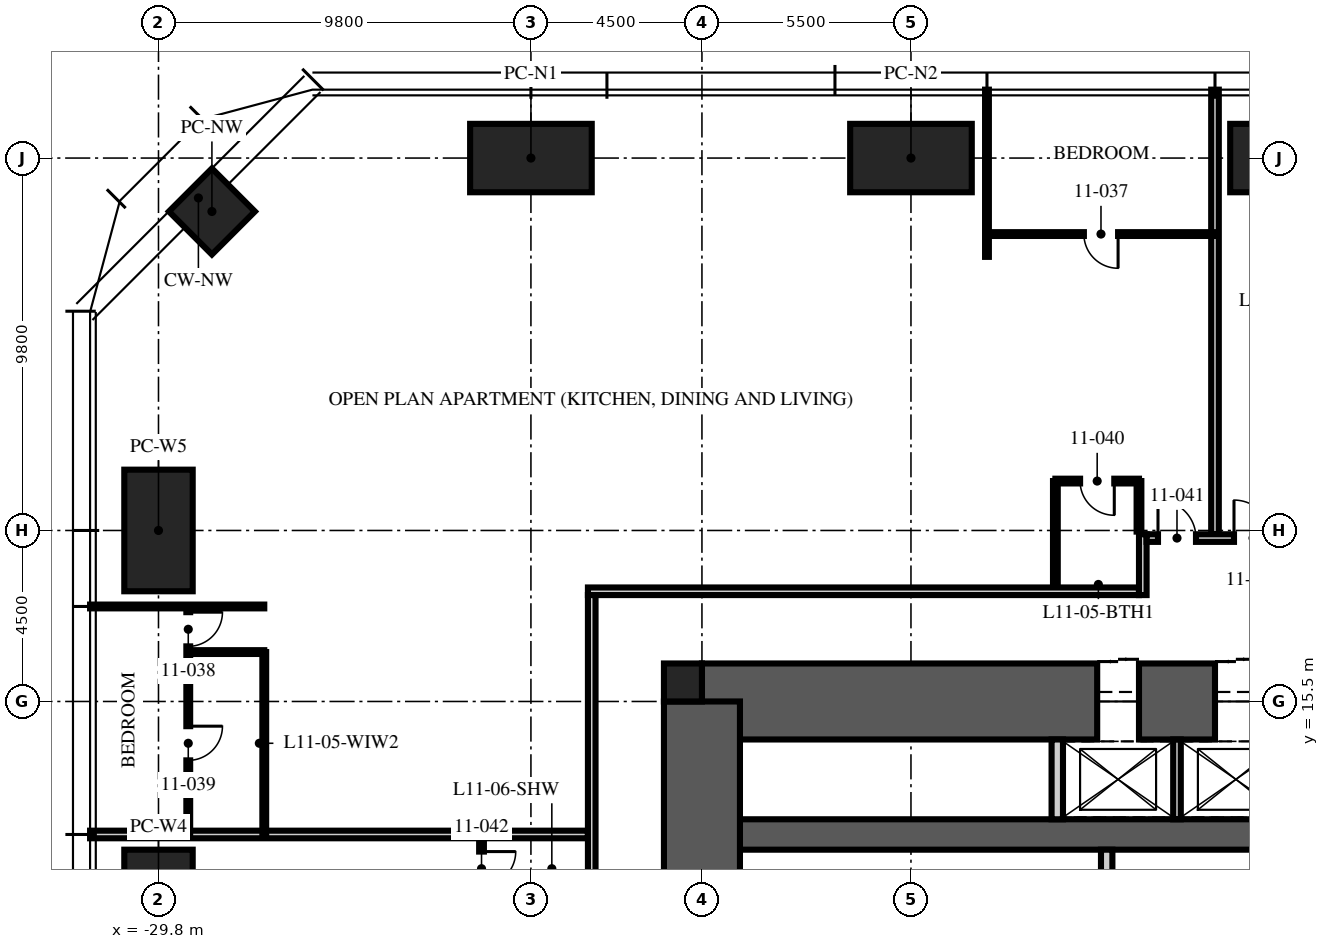
"""IFC4 building model, lengths in metres.
Left out: names, types, materials, properties, quantities, classifications, styles, units other than length and angle.
Written with IfcOpenShell. Run it as: python <this file> out.ifc"""

import sys

from ifc_helpers import new_model, si_unit, direction, frame, frame_2d, origin, origin_2d, place, context, subcontext, project, spatial, rectangle, hollow_rectangle, extrude, element, fill, save


model = new_model("IFC4")
c1 = context("Model", 3, precision=1e-05, world=origin(), true_north=direction((0.0, 1.0)))
c2 = subcontext(c1, "Body", "Model", "MODEL_VIEW")
j1 = project(units=[si_unit("LENGTHUNIT", "METRE"), si_unit("PLANEANGLEUNIT", "RADIAN")], contexts=[c1])
p1 = place(None, origin())
s1 = spatial("IfcSite", under=j1, at=p1, CompositionType="ELEMENT")
p2 = place(p1, origin())
s2 = spatial("IfcBuilding", under=s1, at=p2, CompositionType="ELEMENT")
p3 = place(p2, frame((0.0, 0.0, 47.25)))
s3 = spatial("IfcBuildingStorey", under=s2, at=p3, CompositionType="ELEMENT", Elevation=47.25)
p4 = place(p3, frame((-15.5, 15.5, -0.25), z_axis=(0.0, 0.0, 1.0), x_axis=(1.0, 0.0, 0.0)))
e1 = element("IfcWall", 1, at=p4, inside=s3, PredefinedType="SHEAR", context=c2, shape_type="SweptSolid", body=[
    extrude(rectangle(XDim=31.0, YDim=2.0, at=frame_2d((15.5, 0.0))), origin(), (0.0, 0.0, 1.0), 3.75),
])
p5 = place(p4, frame((10.4, 0.0, 0.25)))
e2 = element("IfcOpeningElement", 2, at=p5, cuts=e1, PredefinedType="OPENING", context=c2, shape_type="SweptSolid", body=[
    extrude(rectangle(XDim=1.1, YDim=2.1, at=frame_2d((0.55, 1.05))), frame((0.0, 1.01, 0.0), z_axis=(0.0, -1.0, 0.0), x_axis=(1.0, 0.0, 0.0)), (0.0, 0.0, 1.0), 2.02),
])
p6 = place(p4, frame((13.5, 0.0, 0.25)))
e3 = element("IfcOpeningElement", 3, at=p6, cuts=e1, PredefinedType="OPENING", context=c2, shape_type="SweptSolid", body=[
    extrude(rectangle(XDim=1.1, YDim=2.1, at=frame_2d((0.55, 1.05))), frame((0.0, 1.01, 0.0), z_axis=(0.0, -1.0, 0.0), x_axis=(1.0, 0.0, 0.0)), (0.0, 0.0, 1.0), 2.02),
])
p7 = place(p4, frame((16.6, 0.0, 0.25)))
e4 = element("IfcOpeningElement", 4, at=p7, cuts=e1, PredefinedType="OPENING", context=c2, shape_type="SweptSolid", body=[
    extrude(rectangle(XDim=1.1, YDim=2.1, at=frame_2d((0.55, 1.05))), frame((0.0, 1.01, 0.0), z_axis=(0.0, -1.0, 0.0), x_axis=(1.0, 0.0, 0.0)), (0.0, 0.0, 1.0), 2.02),
])
p8 = place(p3, frame((-15.5, 12.0, -0.25), z_axis=(0.0, 0.0, 1.0), x_axis=(1.0, 0.0, 0.0)))
e5 = element("IfcWall", 5, at=p8, inside=s3, PredefinedType="SHEAR", context=c2, shape_type="SweptSolid", body=[
    extrude(rectangle(XDim=31.0, YDim=0.8, at=frame_2d((15.5, 0.0))), origin(), (0.0, 0.0, 1.0), 3.75),
])
p9 = place(p3, frame((-15.5, -15.5, -0.25), z_axis=(0.0, 0.0, 1.0), x_axis=(0.0, 1.0, 0.0)))
e6 = element("IfcWall", 6, at=p9, inside=s3, PredefinedType="SHEAR", context=c2, shape_type="SweptSolid", body=[
    extrude(rectangle(XDim=31.0, YDim=2.0, at=frame_2d((15.5, 0.0))), origin(), (0.0, 0.0, 1.0), 3.75),
])
p10 = place(p9, frame((6.5, 0.0, 0.25)))
e7 = element("IfcOpeningElement", 7, at=p10, cuts=e6, PredefinedType="OPENING", context=c2, shape_type="SweptSolid", body=[
    extrude(rectangle(XDim=1.2, YDim=2.1, at=frame_2d((0.6, 1.05))), frame((0.0, 1.01, 0.0), z_axis=(0.0, -1.0, 0.0), x_axis=(1.0, 0.0, 0.0)), (0.0, 0.0, 1.0), 2.02),
])
p11 = place(p9, frame((23.0, 0.0, 0.25)))
e8 = element("IfcOpeningElement", 8, at=p11, cuts=e6, PredefinedType="OPENING", context=c2, shape_type="SweptSolid", body=[
    extrude(rectangle(XDim=1.8, YDim=2.1, at=frame_2d((0.9, 1.05))), frame((0.0, 1.01, 0.0), z_axis=(0.0, -1.0, 0.0), x_axis=(1.0, 0.0, 0.0)), (0.0, 0.0, 1.0), 2.02),
])
p12 = place(p3, frame((-16.0, 16.0, -0.25), z_axis=(0.0, 0.0, 1.0), x_axis=(1.0, 0.0, 0.0)))
e9 = element("IfcColumn", 9, at=p12, inside=s3, PredefinedType="COLUMN", context=c2, shape_type="SweptSolid", body=[
    extrude(rectangle(XDim=1.0, YDim=1.0, at=origin_2d()), origin(), (0.0, 0.0, 1.0), 3.75),
])
for number, where, z_axis, x_axis in (
    (10, (-20.0, 29.8, 0.0), (0.0, 0.0, 1.0), (1.0, 0.0, 0.0)),
    (11, (-10.0, 29.8, 0.0), (0.0, 0.0, 1.0), (1.0, 0.0, 0.0)),
    (12, (0.0, 29.8, 0.0), (0.0, 0.0, 1.0), (1.0, 0.0, 0.0)),
    (13, (-29.8, 10.0, 0.0), (0.0, 0.0, 1.0), (0.0, 1.0, 0.0)),
    (14, (-29.8, 20.0, 0.0), (0.0, 0.0, 1.0), (0.0, 1.0, 0.0)),
):
    element("IfcColumn", number, at=place(p3, frame(where, z_axis=z_axis, x_axis=x_axis)), inside=s3, PredefinedType="COLUMN", context=c2, shape_type="SweptSolid", body=[
        extrude(hollow_rectangle(XDim=3.2, YDim=1.8, WallThickness=0.2, at=origin_2d()), origin(), (0.0, 0.0, 1.0), 3.75),
    ])
p13 = place(p3, frame((-28.394, 28.394, 0.0), z_axis=(0.0, 0.0, 1.0), x_axis=(0.707106781187, 0.707106781187, 0.0)))
e15 = element("IfcColumn", 15, at=p13, inside=s3, PredefinedType="COLUMN", context=c2, shape_type="SweptSolid", body=[
    extrude(hollow_rectangle(XDim=1.6, YDim=1.6, WallThickness=0.1, at=origin_2d()), origin(), (0.0, 0.0, 1.0), 3.75),
])
p14 = place(p3, frame((-6.15, 12.4, 0.0), z_axis=(0.0, 0.0, 1.0), x_axis=(0.0, 1.0, 0.0)))
e16 = element("IfcWall", 16, at=p14, inside=s3, PredefinedType="PARTITIONING", context=c2, shape_type="SweptSolid", body=[
    extrude(rectangle(XDim=2.1, YDim=0.3, at=frame_2d((1.05, 0.0))), origin(), (0.0, 0.0, 1.0), 3.5),
])
p15 = place(p3, frame((-3.0, 12.4, 0.0), z_axis=(0.0, 0.0, 1.0), x_axis=(0.0, 1.0, 0.0)))
e17 = element("IfcWall", 17, at=p15, inside=s3, PredefinedType="PARTITIONING", context=c2, shape_type="SweptSolid", body=[
    extrude(rectangle(XDim=2.1, YDim=0.2, at=frame_2d((1.05, 0.0))), origin(), (0.0, 0.0, 1.0), 3.5),
])
p16 = place(p3, frame((-4.85, 5.3, 0.0), z_axis=(0.0, 0.0, 1.0), x_axis=(0.0, 1.0, 0.0)))
e18 = element("IfcWall", 18, at=p16, inside=s3, PredefinedType="PARTITIONING", context=c2, shape_type="SweptSolid", body=[
    extrude(rectangle(XDim=6.3, YDim=0.3, at=frame_2d((3.15, 0.0))), origin(), (0.0, 0.0, 1.0), 3.5),
])
p17 = place(p16, frame((4.35, 0.0, 0.0)))
e19 = element("IfcOpeningElement", 19, at=p17, cuts=e18, PredefinedType="OPENING", context=c2, shape_type="SweptSolid", body=[
    extrude(rectangle(XDim=0.9, YDim=2.1, at=frame_2d((0.45, 1.05))), frame((0.0, 0.16, 0.0), z_axis=(0.0, -1.0, 0.0), x_axis=(1.0, 0.0, 0.0)), (0.0, 0.0, 1.0), 0.32),
])
p18 = place(p3, frame((-2.0, 19.9, 0.0), z_axis=(0.0, 0.0, 1.0), x_axis=(0.0, 1.0, 0.0)))
e20 = element("IfcWall", 20, at=p18, inside=s3, PredefinedType="PARTITIONING", context=c2, shape_type="SweptSolid", body=[
    extrude(rectangle(XDim=11.7, YDim=0.2, at=frame_2d((5.85, 0.0))), origin(), (0.0, 0.0, 1.0), 2.71),
])
p19 = place(p3, frame((-8.0, 27.2, 0.0), z_axis=(0.0, 0.0, 1.0), x_axis=(0.0, 1.0, 0.0)))
e21 = element("IfcWall", 21, at=p19, inside=s3, PredefinedType="PARTITIONING", context=c2, shape_type="SweptSolid", body=[
    extrude(rectangle(XDim=4.4, YDim=0.1, at=frame_2d((2.2, 0.0))), origin(), (0.0, 0.0, 1.0), 2.71),
])
p20 = place(p3, frame((-27.017, 18.0, 0.0), z_axis=(0.0, 0.0, 1.0), x_axis=(-1.0, 0.0, 0.0)))
e22 = element("IfcWall", 22, at=p20, inside=s3, PredefinedType="PARTITIONING", context=c2, shape_type="SweptSolid", body=[
    extrude(rectangle(XDim=4.583, YDim=0.1, at=frame_2d((2.292, 0.0))), origin(), (0.0, 0.0, 1.0), 2.71),
])
p21 = place(p3, frame((-18.5, 12.0, 0.0), z_axis=(0.0, 0.0, 1.0), x_axis=(-1.0, 0.0, 0.0)))
e23 = element("IfcWall", 23, at=p21, inside=s3, PredefinedType="PARTITIONING", context=c2, shape_type="SweptSolid", body=[
    extrude(rectangle(XDim=13.1, YDim=0.2, at=frame_2d((6.55, 0.0))), origin(), (0.0, 0.0, 1.0), 2.71),
])
p22 = place(p3, frame((-2.0, 27.8, 0.0), z_axis=(0.0, 0.0, 1.0), x_axis=(-1.0, 0.0, 0.0)))
e24 = element("IfcWall", 24, at=p22, inside=s3, PredefinedType="PARTITIONING", context=c2, shape_type="SweptSolid", body=[
    extrude(rectangle(XDim=6.0, YDim=0.1, at=frame_2d((3.0, 0.0))), origin(), (0.0, 0.0, 1.0), 2.61),
])
p23 = place(p22, frame((2.55, 0.0, 0.0)))
e25 = element("IfcOpeningElement", 25, at=p23, cuts=e24, PredefinedType="OPENING", context=c2, shape_type="SweptSolid", body=[
    extrude(rectangle(XDim=0.9, YDim=2.1, at=frame_2d((0.45, 1.05))), frame((0.0, 0.06, 0.0), z_axis=(0.0, -1.0, 0.0), x_axis=(1.0, 0.0, 0.0)), (0.0, 0.0, 1.0), 0.12),
])
p24 = place(p3, frame((-29.017, 18.0, 0.0), z_axis=(0.0, 0.0, 1.0), x_axis=(0.0, -1.0, 0.0)))
e26 = element("IfcWall", 26, at=p24, inside=s3, PredefinedType="PARTITIONING", context=c2, shape_type="SweptSolid", body=[
    extrude(rectangle(XDim=6.0, YDim=0.1, at=frame_2d((3.0, 0.0))), origin(), (0.0, 0.0, 1.0), 2.61),
])
p25 = place(p24, frame((0.15, 0.0, 0.0)))
e27 = element("IfcOpeningElement", 27, at=p25, cuts=e26, PredefinedType="OPENING", context=c2, shape_type="SweptSolid", body=[
    extrude(rectangle(XDim=0.9, YDim=2.1, at=frame_2d((0.45, 1.05))), frame((0.0, 0.06, 0.0), z_axis=(0.0, -1.0, 0.0), x_axis=(1.0, 0.0, 0.0)), (0.0, 0.0, 1.0), 0.12),
])
p26 = place(p24, frame((3.15, 0.0, 0.0)))
e28 = element("IfcOpeningElement", 28, at=p26, cuts=e26, PredefinedType="OPENING", context=c2, shape_type="SweptSolid", body=[
    extrude(rectangle(XDim=0.9, YDim=2.1, at=frame_2d((0.45, 1.05))), frame((0.0, 0.06, 0.0), z_axis=(0.0, -1.0, 0.0), x_axis=(1.0, 0.0, 0.0)), (0.0, 0.0, 1.0), 0.12),
])
p27 = place(p3, frame((-27.017, 16.8, 0.0), z_axis=(0.0, 0.0, 1.0), x_axis=(-1.0, 0.0, 0.0)))
e29 = element("IfcWall", 29, at=p27, inside=s3, PredefinedType="PARTITIONING", context=c2, shape_type="SweptSolid", body=[
    extrude(rectangle(XDim=2.0, YDim=0.1, at=frame_2d((1.0, 0.0))), origin(), (0.0, 0.0, 1.0), 3.5),
])
p28 = place(p3, frame((-27.017, 16.8, 0.0), z_axis=(0.0, 0.0, 1.0), x_axis=(0.0, -1.0, 0.0)))
e30 = element("IfcWall", 30, at=p28, inside=s3, PredefinedType="PARTITIONING", context=c2, shape_type="SweptSolid", body=[
    extrude(rectangle(XDim=4.8, YDim=0.1, at=frame_2d((2.4, 0.0))), origin(), (0.0, 0.0, 1.0), 2.61),
])
p29 = place(p3, frame((-4.0, 21.3, 0.0), z_axis=(0.0, 0.0, 1.0), x_axis=(-1.0, 0.0, 0.0)))
e31 = element("IfcWall", 31, at=p29, inside=s3, PredefinedType="PARTITIONING", context=c2, shape_type="SweptSolid", body=[
    extrude(rectangle(XDim=2.2, YDim=0.125, at=frame_2d((1.1, 0.0))), origin(), (0.0, 0.0, 1.0), 2.61),
])
p30 = place(p29, frame((0.65, 0.0, 0.0)))
e32 = element("IfcOpeningElement", 32, at=p30, cuts=e31, PredefinedType="OPENING", context=c2, shape_type="SweptSolid", body=[
    extrude(rectangle(XDim=0.9, YDim=2.1, at=frame_2d((0.45, 1.05))), frame((0.0, 0.073, 0.0), z_axis=(0.0, -1.0, 0.0), x_axis=(1.0, 0.0, 0.0)), (0.0, 0.0, 1.0), 0.145),
])
p31 = place(p3, frame((-4.0, 19.97, 0.0), z_axis=(0.0, 0.0, 1.0), x_axis=(0.0, 1.0, 0.0)))
e33 = element("IfcWall", 33, at=p31, inside=s3, PredefinedType="PARTITIONING", context=c2, shape_type="SweptSolid", body=[
    extrude(rectangle(XDim=1.33, YDim=0.125, at=frame_2d((0.665, 0.0))), origin(), (0.0, 0.0, 1.0), 3.5),
])
p32 = place(p3, frame((-6.2, 18.5, 0.0), z_axis=(0.0, 0.0, 1.0), x_axis=(0.0, 1.0, 0.0)))
e34 = element("IfcWall", 34, at=p32, inside=s3, PredefinedType="PARTITIONING", context=c2, shape_type="SweptSolid", body=[
    extrude(rectangle(XDim=2.8, YDim=0.125, at=frame_2d((1.4, 0.0))), origin(), (0.0, 0.0, 1.0), 3.5),
])
p33 = place(p3, frame((-21.3, 12.0, 0.0), z_axis=(0.0, 0.0, 1.0), x_axis=(0.0, -1.0, 0.0)))
e35 = element("IfcWall", 35, at=p33, inside=s3, PredefinedType="PARTITIONING", context=c2, shape_type="SweptSolid", body=[
    extrude(rectangle(XDim=1.8, YDim=0.125, at=frame_2d((0.9, 0.0))), origin(), (0.0, 0.0, 1.0), 3.5),
])
p34 = place(p33, frame((0.45, 0.0, 0.0)))
e36 = element("IfcOpeningElement", 36, at=p34, cuts=e35, PredefinedType="OPENING", context=c2, shape_type="SweptSolid", body=[
    extrude(rectangle(XDim=0.9, YDim=2.1, at=frame_2d((0.45, 1.05))), frame((0.0, 0.073, 0.0), z_axis=(0.0, -1.0, 0.0), x_axis=(1.0, 0.0, 0.0)), (0.0, 0.0, 1.0), 0.145),
])
p35 = place(p3, frame((-18.5, 18.4, 0.0), z_axis=(0.0, 0.0, 1.0), x_axis=(1.0, 0.0, 0.0)))
e37 = element("IfcWall", 37, at=p35, inside=s3, PredefinedType="PARTITIONING", context=c2, shape_type="SweptSolid", body=[
    extrude(rectangle(XDim=14.5, YDim=0.2, at=frame_2d((7.25, 0.0))), origin(), (0.0, 0.0, 1.0), 2.3),
])
p36 = place(p3, frame((-3.9, 18.3, 0.0), z_axis=(0.0, 0.0, 1.0), x_axis=(0.0, 1.0, 0.0)))
e38 = element("IfcWall", 38, at=p36, inside=s3, PredefinedType="PARTITIONING", context=c2, shape_type="SweptSolid", body=[
    extrude(rectangle(XDim=1.6, YDim=0.2, at=frame_2d((0.8, 0.0))), origin(), (0.0, 0.0, 1.0), 3.5),
])
p37 = place(p3, frame((-3.8, 19.8, 0.0), z_axis=(0.0, 0.0, 1.0), x_axis=(1.0, 0.0, 0.0)))
e39 = element("IfcWall", 39, at=p37, inside=s3, PredefinedType="PARTITIONING", context=c2, shape_type="SweptSolid", body=[
    extrude(rectangle(XDim=3.6, YDim=0.2, at=frame_2d((1.8, 0.0))), origin(), (0.0, 0.0, 1.0), 3.5),
])
p38 = place(p37, frame((2.3, 0.0, 0.0)))
e40 = element("IfcOpeningElement", 40, at=p38, cuts=e39, PredefinedType="OPENING", context=c2, shape_type="SweptSolid", body=[
    extrude(rectangle(XDim=1.0, YDim=2.2, at=frame_2d((0.5, 1.1))), frame((0.0, 0.11, 0.0), z_axis=(0.0, -1.0, 0.0), x_axis=(1.0, 0.0, 0.0)), (0.0, 0.0, 1.0), 0.22),
])
p39 = place(p37, frame((0.3, 0.0, 0.0)))
e41 = element("IfcOpeningElement", 41, at=p39, cuts=e39, PredefinedType="OPENING", context=c2, shape_type="SweptSolid", body=[
    extrude(rectangle(XDim=1.0, YDim=2.2, at=frame_2d((0.5, 1.1))), frame((0.0, 0.11, 0.0), z_axis=(0.0, -1.0, 0.0), x_axis=(1.0, 0.0, 0.0)), (0.0, 0.0, 1.0), 0.22),
])
p40 = place(p3, frame((-18.4, 18.3, 0.0), z_axis=(0.0, 0.0, 1.0), x_axis=(0.0, -1.0, 0.0)))
e42 = element("IfcWall", 42, at=p40, inside=s3, PredefinedType="PARTITIONING", context=c2, shape_type="SweptSolid", body=[
    extrude(rectangle(XDim=36.6, YDim=0.2, at=frame_2d((18.3, 0.0))), origin(), (0.0, 0.0, 1.0), 2.3),
])
p41 = place(p40, frame((8.87, 0.0, 0.0)))
e43 = element("IfcOpeningElement", 43, at=p41, cuts=e42, PredefinedType="OPENING", context=c2, shape_type="SweptSolid", body=[
    extrude(rectangle(XDim=1.0, YDim=2.2, at=frame_2d((0.5, 1.1))), frame((0.0, 0.11, 0.0), z_axis=(0.0, -1.0, 0.0), x_axis=(1.0, 0.0, 0.0)), (0.0, 0.0, 1.0), 0.22),
])
p42 = place(p40, frame((18.57, 0.0, 0.0)))
e44 = element("IfcOpeningElement", 44, at=p42, cuts=e42, PredefinedType="OPENING", context=c2, shape_type="SweptSolid", body=[
    extrude(rectangle(XDim=1.0, YDim=2.2, at=frame_2d((0.5, 1.1))), frame((0.0, 0.11, 0.0), z_axis=(0.0, -1.0, 0.0), x_axis=(1.0, 0.0, 0.0)), (0.0, 0.0, 1.0), 0.22),
])
p43 = place(p40, frame((34.82, 0.0, 0.0)))
e45 = element("IfcOpeningElement", 45, at=p43, cuts=e42, PredefinedType="OPENING", context=c2, shape_type="SweptSolid", body=[
    extrude(rectangle(XDim=1.0, YDim=2.2, at=frame_2d((0.5, 1.1))), frame((0.0, 0.11, 0.0), z_axis=(0.0, -1.0, 0.0), x_axis=(1.0, 0.0, 0.0)), (0.0, 0.0, 1.0), 0.22),
])
p44 = place(p5, origin())
e46 = element("IfcDoor", 46, at=p44, inside=s3, OperationType="DOUBLE_DOOR_SLIDING", PredefinedType="DOOR", context=c2, shape_type="SweptSolid", body=[
    extrude(rectangle(XDim=1.1, YDim=2.1, at=frame_2d((0.55, 1.05))), frame((0.0, 0.025, 0.0), z_axis=(0.0, -1.0, 0.0), x_axis=(1.0, 0.0, 0.0)), (0.0, 0.0, 1.0), 0.05),
])
fill(e2, e46)
p45 = place(p6, origin())
e47 = element("IfcDoor", 47, at=p45, inside=s3, OperationType="DOUBLE_DOOR_SLIDING", PredefinedType="DOOR", context=c2, shape_type="SweptSolid", body=[
    extrude(rectangle(XDim=1.1, YDim=2.1, at=frame_2d((0.55, 1.05))), frame((0.0, 0.025, 0.0), z_axis=(0.0, -1.0, 0.0), x_axis=(1.0, 0.0, 0.0)), (0.0, 0.0, 1.0), 0.05),
])
fill(e3, e47)
p46 = place(p38, origin())
e48 = element("IfcDoor", 48, at=p46, inside=s3, OperationType="SINGLE_SWING_LEFT", PredefinedType="DOOR", context=c2, shape_type="SweptSolid", body=[
    extrude(rectangle(XDim=1.0, YDim=2.2, at=frame_2d((0.5, 1.1))), frame((0.0, 0.025, 0.0), z_axis=(0.0, -1.0, 0.0), x_axis=(1.0, 0.0, 0.0)), (0.0, 0.0, 1.0), 0.05),
])
fill(e40, e48)
p47 = place(p23, origin())
e49 = element("IfcDoor", 49, at=p47, inside=s3, OperationType="SINGLE_SWING_LEFT", PredefinedType="DOOR", context=c2, shape_type="SweptSolid", body=[
    extrude(rectangle(XDim=0.9, YDim=2.1, at=frame_2d((0.45, 1.05))), frame((0.0, 0.025, 0.0), z_axis=(0.0, -1.0, 0.0), x_axis=(1.0, 0.0, 0.0)), (0.0, 0.0, 1.0), 0.05),
])
fill(e25, e49)
p48 = place(p25, origin())
e50 = element("IfcDoor", 50, at=p48, inside=s3, OperationType="SINGLE_SWING_LEFT", PredefinedType="DOOR", context=c2, shape_type="SweptSolid", body=[
    extrude(rectangle(XDim=0.9, YDim=2.1, at=frame_2d((0.45, 1.05))), frame((0.0, 0.025, 0.0), z_axis=(0.0, -1.0, 0.0), x_axis=(1.0, 0.0, 0.0)), (0.0, 0.0, 1.0), 0.05),
])
fill(e27, e50)
p49 = place(p26, origin())
e51 = element("IfcDoor", 51, at=p49, inside=s3, OperationType="SINGLE_SWING_LEFT", PredefinedType="DOOR", context=c2, shape_type="SweptSolid", body=[
    extrude(rectangle(XDim=0.9, YDim=2.1, at=frame_2d((0.45, 1.05))), frame((0.0, 0.025, 0.0), z_axis=(0.0, -1.0, 0.0), x_axis=(1.0, 0.0, 0.0)), (0.0, 0.0, 1.0), 0.05),
])
fill(e28, e51)
p50 = place(p30, origin())
e52 = element("IfcDoor", 52, at=p50, inside=s3, OperationType="SINGLE_SWING_LEFT", PredefinedType="DOOR", context=c2, shape_type="SweptSolid", body=[
    extrude(rectangle(XDim=0.9, YDim=2.1, at=frame_2d((0.45, 1.05))), frame((0.0, 0.025, 0.0), z_axis=(0.0, -1.0, 0.0), x_axis=(1.0, 0.0, 0.0)), (0.0, 0.0, 1.0), 0.05),
])
fill(e32, e52)
p51 = place(p39, origin())
e53 = element("IfcDoor", 53, at=p51, inside=s3, OperationType="SINGLE_SWING_LEFT", PredefinedType="DOOR", context=c2, shape_type="SweptSolid", body=[
    extrude(rectangle(XDim=1.0, YDim=2.2, at=frame_2d((0.5, 1.1))), frame((0.0, 0.025, 0.0), z_axis=(0.0, -1.0, 0.0), x_axis=(1.0, 0.0, 0.0)), (0.0, 0.0, 1.0), 0.05),
])
fill(e41, e53)
p52 = place(p34, origin())
e54 = element("IfcDoor", 54, at=p52, inside=s3, OperationType="SINGLE_SWING_LEFT", PredefinedType="DOOR", context=c2, shape_type="SweptSolid", body=[
    extrude(rectangle(XDim=0.9, YDim=2.1, at=frame_2d((0.45, 1.05))), frame((0.0, 0.025, 0.0), z_axis=(0.0, -1.0, 0.0), x_axis=(1.0, 0.0, 0.0)), (0.0, 0.0, 1.0), 0.05),
])
fill(e36, e54)
save(model, sys.argv[1])
